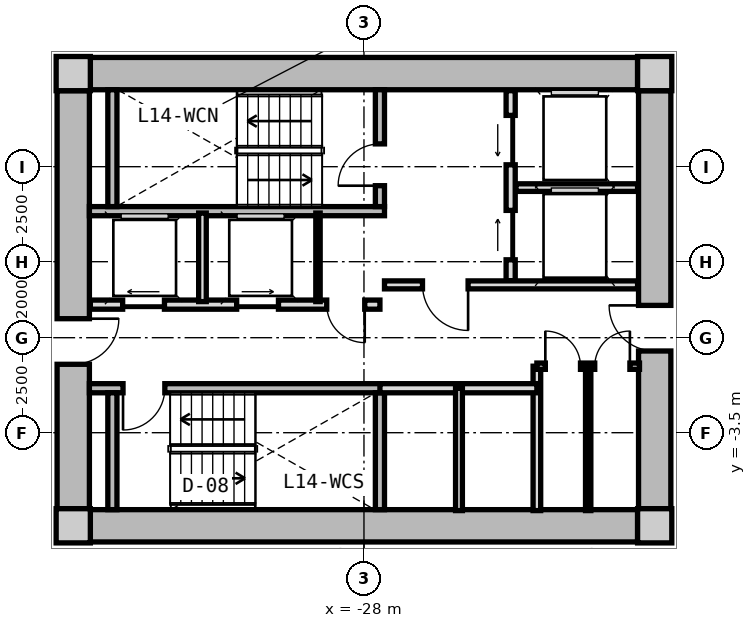
"""IFC4 building model, lengths in metres.
Left out: names, types, materials, properties, quantities, classifications, styles, units other than length and angle.
Written with IfcOpenShell. Run it as: python <this file> out.ifc"""

import sys

from ifc_helpers import new_model, si_unit, direction, frame, frame_2d, origin, origin_2d, place, context, subcontext, project, spatial, rectangle, extrude, source, transform, mapped, element, fill, save


model = new_model("IFC4")
c1 = context("Model", 3, precision=1e-05, world=origin(), true_north=direction((0.0, 1.0)))
c2 = subcontext(c1, "Body", "Model", "MODEL_VIEW")
j1 = project(units=[si_unit("LENGTHUNIT", "METRE"), si_unit("PLANEANGLEUNIT", "RADIAN")], contexts=[c1])
p1 = place(None, origin())
s1 = spatial("IfcSite", under=j1, at=p1, CompositionType="ELEMENT")
p2 = place(p1, origin())
s2 = spatial("IfcBuilding", under=s1, at=p2, CompositionType="ELEMENT")
p3 = place(p2, frame((0.0, 0.0, 49.05)))
s3 = spatial("IfcBuildingStorey", under=s2, at=p3, CompositionType="ELEMENT", Elevation=49.05)
m1 = source(origin(), c2, "Body", "SweptSolid", [
    extrude(rectangle(XDim=0.9, YDim=0.9, at=origin_2d()), origin(), (0.0, 0.0, 1.0), 3.05),
])
for number, where, z_axis, x_axis in (
    (1, (-35.65, -5.95, 0.0), (0.0, 0.0, 1.0), (1.0, 0.0, 0.0)),
    (2, (-20.35, -5.95, 0.0), (0.0, 0.0, 1.0), (1.0, 0.0, 0.0)),
    (3, (-20.35, 5.95, 0.0), (0.0, 0.0, 1.0), (1.0, 0.0, 0.0)),
    (4, (-35.65, 5.95, 0.0), (0.0, 0.0, 1.0), (1.0, 0.0, 0.0)),
):
    element("IfcColumn", number, at=place(p3, frame(where, z_axis=z_axis, x_axis=x_axis)), inside=s3, PredefinedType="COLUMN", context=c2, shape_type="MappedRepresentation", body=[
        mapped(m1, transform((0.0, 0.0, 0.0), x_axis=(1.0, 0.0, 0.0), y_axis=(0.0, 1.0, 0.0), z_axis=(0.0, 0.0, 1.0), scale=1.0)),
    ])
m2 = source(origin(), c2, "Body", "SweptSolid", [
    extrude(rectangle(XDim=14.4, YDim=0.85, at=frame_2d((7.2, 0.0))), origin(), (0.0, 0.0, 1.0), 2.79),
])
for number, where, z_axis, x_axis in (
    (5, (-35.2, 5.95, 0.0), (0.0, 0.0, 1.0), (1.0, 0.0, 0.0)),
    (6, (-20.8, -5.95, 0.0), (0.0, 0.0, 1.0), (-1.0, 0.0, 0.0)),
):
    element("IfcWall", number, at=place(p3, frame(where, z_axis=z_axis, x_axis=x_axis)), inside=s3, PredefinedType="SHEAR", context=c2, shape_type="MappedRepresentation", body=[
        mapped(m2, transform((0.0, 0.0, 0.0), x_axis=(1.0, 0.0, 0.0), y_axis=(0.0, 1.0, 0.0), z_axis=(0.0, 0.0, 1.0), scale=1.0)),
    ])
m3 = source(origin(), c2, "Body", "SweptSolid", [
    extrude(rectangle(XDim=11.0, YDim=0.85, at=frame_2d((5.5, 0.0))), origin(), (0.0, 0.0, 1.0), 2.79),
])
p4 = place(p3, frame((-35.65, -5.5, 0.0), z_axis=(0.0, 0.0, 1.0), x_axis=(0.0, 1.0, 0.0)))
e7 = element("IfcWall", 7, at=p4, inside=s3, PredefinedType="SHEAR", context=c2, shape_type="MappedRepresentation", body=[
    mapped(m3, transform((0.0, 0.0, 0.0), x_axis=(1.0, 0.0, 0.0), y_axis=(0.0, 1.0, 0.0), z_axis=(0.0, 0.0, 1.0), scale=1.0)),
])
p5 = place(p4, frame((3.8, 0.0, 0.0)))
e8 = element("IfcOpeningElement", 8, at=p5, cuts=e7, PredefinedType="OPENING", context=c2, shape_type="SweptSolid", body=[
    extrude(rectangle(XDim=1.2, YDim=2.15, at=frame_2d((0.6, 1.075))), frame((0.0, 0.435, 0.0), z_axis=(0.0, -1.0, 0.0), x_axis=(1.0, 0.0, 0.0)), (0.0, 0.0, 1.0), 0.87),
])
p6 = place(p3, frame((-20.35, 5.5, 0.0), z_axis=(0.0, 0.0, 1.0), x_axis=(0.0, -1.0, 0.0)))
e9 = element("IfcWall", 9, at=p6, inside=s3, PredefinedType="SHEAR", context=c2, shape_type="MappedRepresentation", body=[
    mapped(m3, transform((0.0, 0.0, 0.0), x_axis=(1.0, 0.0, 0.0), y_axis=(0.0, 1.0, 0.0), z_axis=(0.0, 0.0, 1.0), scale=1.0)),
])
p7 = place(p6, frame((5.65, 0.0, 0.0)))
e10 = element("IfcOpeningElement", 10, at=p7, cuts=e9, PredefinedType="OPENING", context=c2, shape_type="SweptSolid", body=[
    extrude(rectangle(XDim=1.2, YDim=2.15, at=frame_2d((0.6, 1.075))), frame((0.0, 0.435, 0.0), z_axis=(0.0, -1.0, 0.0), x_axis=(1.0, 0.0, 0.0)), (0.0, 0.0, 1.0), 0.87),
])
m4 = source(origin(), c2, "Body", "SweptSolid", [
    extrude(rectangle(XDim=7.765, YDim=0.24, at=frame_2d((3.883, 0.0))), origin(), (0.0, 0.0, 1.0), 2.79),
])
p8 = place(p3, frame((-35.225, 2.33, 0.0), z_axis=(0.0, 0.0, 1.0), x_axis=(1.0, 0.0, 0.0)))
e11 = element("IfcWall", 11, at=p8, inside=s3, PredefinedType="PARTITIONING", context=c2, shape_type="MappedRepresentation", body=[
    mapped(m4, transform((0.0, 0.0, 0.0), x_axis=(1.0, 0.0, 0.0), y_axis=(0.0, 1.0, 0.0), z_axis=(0.0, 0.0, 1.0), scale=1.0)),
])
m5 = source(origin(), c2, "Body", "SweptSolid", [
    extrude(rectangle(XDim=3.075, YDim=0.24, at=frame_2d((1.538, 0.0))), origin(), (0.0, 0.0, 1.0), 2.79),
])
p9 = place(p3, frame((-34.62, 2.45, 0.0), z_axis=(0.0, 0.0, 1.0), x_axis=(0.0, 1.0, 0.0)))
e12 = element("IfcWall", 12, at=p9, inside=s3, PredefinedType="PARTITIONING", context=c2, shape_type="MappedRepresentation", body=[
    mapped(m5, transform((0.0, 0.0, 0.0), x_axis=(1.0, 0.0, 0.0), y_axis=(0.0, 1.0, 0.0), z_axis=(0.0, 0.0, 1.0), scale=1.0)),
])
p10 = place(p3, frame((-27.58, 2.45, 0.0), z_axis=(0.0, 0.0, 1.0), x_axis=(0.0, 1.0, 0.0)))
e13 = element("IfcWall", 13, at=p10, inside=s3, PredefinedType="PARTITIONING", context=c2, shape_type="MappedRepresentation", body=[
    mapped(m5, transform((0.0, 0.0, 0.0), x_axis=(1.0, 0.0, 0.0), y_axis=(0.0, 1.0, 0.0), z_axis=(0.0, 0.0, 1.0), scale=1.0)),
])
p11 = place(p10, frame((0.55, 0.0, 0.0)))
e14 = element("IfcOpeningElement", 14, at=p11, cuts=e13, PredefinedType="OPENING", context=c2, shape_type="SweptSolid", body=[
    extrude(rectangle(XDim=1.1, YDim=2.15, at=frame_2d((0.55, 1.075))), frame((0.0, 0.13, 0.0), z_axis=(0.0, -1.0, 0.0), x_axis=(1.0, 0.0, 0.0)), (0.0, 0.0, 1.0), 0.26),
])
p12 = place(p3, frame((-35.225, -2.33, 0.0), z_axis=(0.0, 0.0, 1.0), x_axis=(1.0, 0.0, 0.0)))
e15 = element("IfcWall", 15, at=p12, inside=s3, PredefinedType="PARTITIONING", context=c2, shape_type="MappedRepresentation", body=[
    mapped(m4, transform((0.0, 0.0, 0.0), x_axis=(1.0, 0.0, 0.0), y_axis=(0.0, 1.0, 0.0), z_axis=(0.0, 0.0, 1.0), scale=1.0)),
])
p13 = place(p12, frame((0.885, 0.0, 0.0)))
e16 = element("IfcOpeningElement", 16, at=p13, cuts=e15, PredefinedType="OPENING", context=c2, shape_type="SweptSolid", body=[
    extrude(rectangle(XDim=1.1, YDim=2.15, at=frame_2d((0.55, 1.075))), frame((0.0, 0.13, 0.0), z_axis=(0.0, -1.0, 0.0), x_axis=(1.0, 0.0, 0.0)), (0.0, 0.0, 1.0), 0.26),
])
for number, where, z_axis, x_axis in (
    (17, (-34.62, -5.525, 0.0), (0.0, 0.0, 1.0), (0.0, 1.0, 0.0)),
    (18, (-27.58, -5.525, 0.0), (0.0, 0.0, 1.0), (0.0, 1.0, 0.0)),
):
    element("IfcWall", number, at=place(p3, frame(where, z_axis=z_axis, x_axis=x_axis)), inside=s3, PredefinedType="PARTITIONING", context=c2, shape_type="MappedRepresentation", body=[
        mapped(m5, transform((0.0, 0.0, 0.0), x_axis=(1.0, 0.0, 0.0), y_axis=(0.0, 1.0, 0.0), z_axis=(0.0, 0.0, 1.0), scale=1.0)),
    ])
m6 = source(origin(), c2, "Body", "SweptSolid", [
    extrude(rectangle(XDim=5.0, YDim=0.24, at=frame_2d((2.5, 0.0))), origin(), (0.0, 0.0, 1.0), 2.775),
])
p14 = place(p3, frame((-24.14, 0.5, 0.0), z_axis=(0.0, 0.0, 1.0), x_axis=(0.0, 1.0, 0.0)))
e19 = element("IfcWall", 19, at=p14, inside=s3, PredefinedType="PARTITIONING", context=c2, shape_type="MappedRepresentation", body=[
    mapped(m6, transform((0.0, 0.0, 0.0), x_axis=(1.0, 0.0, 0.0), y_axis=(0.0, 1.0, 0.0), z_axis=(0.0, 0.0, 1.0), scale=1.0)),
])
p15 = place(p14, frame((3.05, 0.0, 0.0)))
e20 = element("IfcOpeningElement", 20, at=p15, cuts=e19, PredefinedType="OPENING", context=c2, shape_type="SweptSolid", body=[
    extrude(rectangle(XDim=1.3, YDim=2.2, at=frame_2d((0.65, 1.1))), frame((0.0, 0.13, 0.0), z_axis=(0.0, -1.0, 0.0), x_axis=(1.0, 0.0, 0.0)), (0.0, 0.0, 1.0), 0.26),
])
p16 = place(p14, frame((0.55, 0.0, 0.0)))
e21 = element("IfcOpeningElement", 21, at=p16, cuts=e19, PredefinedType="OPENING", context=c2, shape_type="SweptSolid", body=[
    extrude(rectangle(XDim=1.3, YDim=2.2, at=frame_2d((0.65, 1.1))), frame((0.0, 0.13, 0.0), z_axis=(0.0, -1.0, 0.0), x_axis=(1.0, 0.0, 0.0)), (0.0, 0.0, 1.0), 0.26),
])
m7 = source(origin(), c2, "Body", "SweptSolid", [
    extrude(rectangle(XDim=3.2, YDim=0.2, at=frame_2d((1.6, 0.0))), origin(), (0.0, 0.0, 1.0), 2.775),
])
p17 = place(p3, frame((-24.0, 2.95, 0.0), z_axis=(0.0, 0.0, 1.0), x_axis=(1.0, 0.0, 0.0)))
e22 = element("IfcWall", 22, at=p17, inside=s3, PredefinedType="PARTITIONING", context=c2, shape_type="MappedRepresentation", body=[
    mapped(m7, transform((0.0, 0.0, 0.0), x_axis=(1.0, 0.0, 0.0), y_axis=(0.0, 1.0, 0.0), z_axis=(0.0, 0.0, 1.0), scale=1.0)),
])
m8 = source(origin(), c2, "Body", "SweptSolid", [
    extrude(rectangle(XDim=6.66, YDim=0.21, at=frame_2d((3.33, 0.0))), origin(), (0.0, 0.0, 1.0), 2.775),
])
p18 = place(p3, frame((-27.46, 0.39, 0.0), z_axis=(0.0, 0.0, 1.0), x_axis=(1.0, 0.0, 0.0)))
e23 = element("IfcWall", 23, at=p18, inside=s3, PredefinedType="PARTITIONING", context=c2, shape_type="MappedRepresentation", body=[
    mapped(m8, transform((0.0, 0.0, 0.0), x_axis=(1.0, 0.0, 0.0), y_axis=(0.0, 1.0, 0.0), z_axis=(0.0, 0.0, 1.0), scale=1.0)),
])
p19 = place(p18, frame((1.0, 0.0, 0.0)))
e24 = element("IfcOpeningElement", 24, at=p19, cuts=e23, PredefinedType="OPENING", context=c2, shape_type="SweptSolid", body=[
    extrude(rectangle(XDim=1.2, YDim=2.15, at=frame_2d((0.6, 1.075))), frame((0.0, 0.115, 0.0), z_axis=(0.0, -1.0, 0.0), x_axis=(1.0, 0.0, 0.0)), (0.0, 0.0, 1.0), 0.23),
])
m9 = source(origin(), c2, "Body", "SweptSolid", [
    extrude(rectangle(XDim=7.62, YDim=0.24, at=frame_2d((3.81, 0.0))), origin(), (0.0, 0.0, 1.0), 2.775),
])
p20 = place(p3, frame((-35.2, -0.13, 0.0), z_axis=(0.0, 0.0, 1.0), x_axis=(1.0, 0.0, 0.0)))
e25 = element("IfcWall", 25, at=p20, inside=s3, PredefinedType="PARTITIONING", context=c2, shape_type="MappedRepresentation", body=[
    mapped(m9, transform((0.0, 0.0, 0.0), x_axis=(1.0, 0.0, 0.0), y_axis=(0.0, 1.0, 0.0), z_axis=(0.0, 0.0, 1.0), scale=1.0)),
])
p21 = place(p20, frame((6.22, 0.0, 0.0)))
e26 = element("IfcOpeningElement", 26, at=p21, cuts=e25, PredefinedType="OPENING", context=c2, shape_type="SweptSolid", body=[
    extrude(rectangle(XDim=1.0, YDim=2.1, at=frame_2d((0.5, 1.05))), frame((0.0, 0.13, 0.0), z_axis=(0.0, -1.0, 0.0), x_axis=(1.0, 0.0, 0.0)), (0.0, 0.0, 1.0), 0.26),
])
p22 = place(p20, frame((0.85, 0.0, 0.0)))
e27 = element("IfcOpeningElement", 27, at=p22, cuts=e25, PredefinedType="OPENING", context=c2, shape_type="SweptSolid", body=[
    extrude(rectangle(XDim=1.1, YDim=2.2, at=frame_2d((0.55, 1.1))), frame((0.0, 0.13, 0.0), z_axis=(0.0, -1.0, 0.0), x_axis=(1.0, 0.0, 0.0)), (0.0, 0.0, 1.0), 0.26),
])
p23 = place(p20, frame((3.85, 0.0, 0.0)))
e28 = element("IfcOpeningElement", 28, at=p23, cuts=e25, PredefinedType="OPENING", context=c2, shape_type="SweptSolid", body=[
    extrude(rectangle(XDim=1.1, YDim=2.2, at=frame_2d((0.55, 1.1))), frame((0.0, 0.13, 0.0), z_axis=(0.0, -1.0, 0.0), x_axis=(1.0, 0.0, 0.0)), (0.0, 0.0, 1.0), 0.26),
])
m10 = source(origin(), c2, "Body", "SweptSolid", [
    extrude(rectangle(XDim=2.33, YDim=0.115, at=frame_2d((1.165, 0.0))), origin(), (0.0, 0.0, 1.0), 2.775),
])
p24 = place(p3, frame((-29.21, -0.05, 0.0), z_axis=(0.0, 0.0, 1.0), x_axis=(0.0, 1.0, 0.0)))
e29 = element("IfcWall", 29, at=p24, inside=s3, PredefinedType="PARTITIONING", context=c2, shape_type="MappedRepresentation", body=[
    mapped(m10, transform((0.0, 0.0, 0.0), x_axis=(1.0, 0.0, 0.0), y_axis=(0.0, 1.0, 0.0), z_axis=(0.0, 0.0, 1.0), scale=1.0)),
])
m11 = source(origin(), c2, "Body", "SweptSolid", [
    extrude(rectangle(XDim=2.33, YDim=0.2, at=frame_2d((1.165, 0.0))), origin(), (0.0, 0.0, 1.0), 2.775),
])
p25 = place(p3, frame((-32.25, -0.05, 0.0), z_axis=(0.0, 0.0, 1.0), x_axis=(0.0, 1.0, 0.0)))
e30 = element("IfcWall", 30, at=p25, inside=s3, PredefinedType="PARTITIONING", context=c2, shape_type="MappedRepresentation", body=[
    mapped(m11, transform((0.0, 0.0, 0.0), x_axis=(1.0, 0.0, 0.0), y_axis=(0.0, 1.0, 0.0), z_axis=(0.0, 0.0, 1.0), scale=1.0)),
])
m12 = source(origin(), c2, "Body", "SweptSolid", [
    extrude(rectangle(XDim=3.8, YDim=0.2, at=frame_2d((1.9, 0.0))), origin(), (0.0, 0.0, 1.0), 2.775),
])
p26 = place(p3, frame((-23.45, -5.55, 0.0), z_axis=(0.0, 0.0, 1.0), x_axis=(0.0, 1.0, 0.0)))
e31 = element("IfcWall", 31, at=p26, inside=s3, PredefinedType="PARTITIONING", context=c2, shape_type="MappedRepresentation", body=[
    mapped(m12, transform((0.0, 0.0, 0.0), x_axis=(1.0, 0.0, 0.0), y_axis=(0.0, 1.0, 0.0), z_axis=(0.0, 0.0, 1.0), scale=1.0)),
])
m13 = source(origin(), c2, "Body", "SweptSolid", [
    extrude(rectangle(XDim=4.13, YDim=0.24, at=frame_2d((2.065, 0.0))), origin(), (0.0, 0.0, 1.0), 2.775),
])
p27 = place(p3, frame((-27.58, -2.33, 0.0), z_axis=(0.0, 0.0, 1.0), x_axis=(1.0, 0.0, 0.0)))
e32 = element("IfcWall", 32, at=p27, inside=s3, PredefinedType="PARTITIONING", context=c2, shape_type="MappedRepresentation", body=[
    mapped(m13, transform((0.0, 0.0, 0.0), x_axis=(1.0, 0.0, 0.0), y_axis=(0.0, 1.0, 0.0), z_axis=(0.0, 0.0, 1.0), scale=1.0)),
])
m14 = source(origin(), c2, "Body", "SweptSolid", [
    extrude(rectangle(XDim=3.22, YDim=0.18, at=frame_2d((1.61, 0.0))), origin(), (0.0, 0.0, 1.0), 2.775),
])
p28 = place(p3, frame((-25.5, -5.55, 0.0), z_axis=(0.0, 0.0, 1.0), x_axis=(0.0, 1.0, 0.0)))
e33 = element("IfcWall", 33, at=p28, inside=s3, PredefinedType="PARTITIONING", context=c2, shape_type="MappedRepresentation", body=[
    mapped(m14, transform((0.0, 0.0, 0.0), x_axis=(1.0, 0.0, 0.0), y_axis=(0.0, 1.0, 0.0), z_axis=(0.0, 0.0, 1.0), scale=1.0)),
])
m15 = source(origin(), c2, "Body", "SweptSolid", [
    extrude(rectangle(XDim=2.7, YDim=0.165, at=frame_2d((1.35, 0.0))), origin(), (0.0, 0.0, 1.0), 2.775),
])
p29 = place(p3, frame((-23.45, -1.75, 0.0), z_axis=(0.0, 0.0, 1.0), x_axis=(1.0, 0.0, 0.0)))
e34 = element("IfcWall", 34, at=p29, inside=s3, PredefinedType="PARTITIONING", context=c2, shape_type="MappedRepresentation", body=[
    mapped(m15, transform((0.0, 0.0, 0.0), x_axis=(1.0, 0.0, 0.0), y_axis=(0.0, 1.0, 0.0), z_axis=(0.0, 0.0, 1.0), scale=1.0)),
])
p30 = place(p29, frame((0.222, 0.0, 0.0)))
e35 = element("IfcOpeningElement", 35, at=p30, cuts=e34, PredefinedType="OPENING", context=c2, shape_type="SweptSolid", body=[
    extrude(rectangle(XDim=0.925, YDim=2.1, at=frame_2d((0.462, 1.05))), frame((0.0, 0.093, 0.0), z_axis=(0.0, -1.0, 0.0), x_axis=(1.0, 0.0, 0.0)), (0.0, 0.0, 1.0), 0.185),
])
p31 = place(p29, frame((1.522, 0.0, 0.0)))
e36 = element("IfcOpeningElement", 36, at=p31, cuts=e34, PredefinedType="OPENING", context=c2, shape_type="SweptSolid", body=[
    extrude(rectangle(XDim=0.925, YDim=2.1, at=frame_2d((0.462, 1.05))), frame((0.0, 0.093, 0.0), z_axis=(0.0, -1.0, 0.0), x_axis=(1.0, 0.0, 0.0)), (0.0, 0.0, 1.0), 0.185),
])
m16 = source(origin(), c2, "Body", "SweptSolid", [
    extrude(rectangle(XDim=3.8, YDim=0.14, at=frame_2d((1.9, 0.0))), origin(), (0.0, 0.0, 1.0), 2.775),
])
p32 = place(p3, frame((-22.1, -5.55, 0.0), z_axis=(0.0, 0.0, 1.0), x_axis=(0.0, 1.0, 0.0)))
e37 = element("IfcWall", 37, at=p32, inside=s3, PredefinedType="PARTITIONING", context=c2, shape_type="MappedRepresentation", body=[
    mapped(m16, transform((0.0, 0.0, 0.0), x_axis=(1.0, 0.0, 0.0), y_axis=(0.0, 1.0, 0.0), z_axis=(0.0, 0.0, 1.0), scale=1.0)),
])
m17 = source(origin(), c2, "Body", "SweptSolid", [
    extrude(rectangle(XDim=1.1, YDim=2.15, at=frame_2d((0.55, 1.075))), frame((0.0, 0.025, 0.0), z_axis=(0.0, -1.0, 0.0), x_axis=(1.0, 0.0, 0.0)), (0.0, 0.0, 1.0), 0.05),
])
p33 = place(p11, origin())
e38 = element("IfcDoor", 38, at=p33, inside=s3, OperationType="SINGLE_SWING_LEFT", PredefinedType="DOOR", context=c2, shape_type="MappedRepresentation", body=[
    mapped(m17, transform((0.0, 0.0, 0.0), x_axis=(1.0, 0.0, 0.0), y_axis=(0.0, 1.0, 0.0), z_axis=(0.0, 0.0, 1.0), scale=1.0)),
])
fill(e14, e38)
p34 = place(p13, frame((1.1, 0.0, 0.0), z_axis=(0.0, 0.0, 1.0), x_axis=(-1.0, 0.0, 0.0)))
e39 = element("IfcDoor", 39, at=p34, inside=s3, OperationType="SINGLE_SWING_RIGHT", PredefinedType="DOOR", context=c2, shape_type="MappedRepresentation", body=[
    mapped(m17, transform((0.0, 0.0, 0.0), x_axis=(1.0, 0.0, 0.0), y_axis=(0.0, 1.0, 0.0), z_axis=(0.0, 0.0, 1.0), scale=1.0)),
])
fill(e16, e39)
m18 = source(origin(), c2, "Body", "SweptSolid", [
    extrude(rectangle(XDim=1.3, YDim=2.2, at=frame_2d((0.65, 1.1))), frame((0.0, 0.025, 0.0), z_axis=(0.0, -1.0, 0.0), x_axis=(1.0, 0.0, 0.0)), (0.0, 0.0, 1.0), 0.05),
])
p35 = place(p15, origin())
e40 = element("IfcDoor", 40, at=p35, inside=s3, OperationType="SLIDING_TO_LEFT", PredefinedType="DOOR", context=c2, shape_type="MappedRepresentation", body=[
    mapped(m18, transform((0.0, 0.0, 0.0), x_axis=(1.0, 0.0, 0.0), y_axis=(0.0, 1.0, 0.0), z_axis=(0.0, 0.0, 1.0), scale=1.0)),
])
fill(e20, e40)
p36 = place(p16, origin())
e41 = element("IfcDoor", 41, at=p36, inside=s3, OperationType="SLIDING_TO_RIGHT", PredefinedType="DOOR", context=c2, shape_type="MappedRepresentation", body=[
    mapped(m18, transform((0.0, 0.0, 0.0), x_axis=(1.0, 0.0, 0.0), y_axis=(0.0, 1.0, 0.0), z_axis=(0.0, 0.0, 1.0), scale=1.0)),
])
fill(e21, e41)
m19 = source(origin(), c2, "Body", "SweptSolid", [
    extrude(rectangle(XDim=1.2, YDim=2.15, at=frame_2d((0.6, 1.075))), frame((0.0, 0.025, 0.0), z_axis=(0.0, -1.0, 0.0), x_axis=(1.0, 0.0, 0.0)), (0.0, 0.0, 1.0), 0.05),
])
p37 = place(p19, frame((1.2, 0.0, 0.0), z_axis=(0.0, 0.0, 1.0), x_axis=(-1.0, 0.0, 0.0)))
e42 = element("IfcDoor", 42, at=p37, inside=s3, OperationType="SINGLE_SWING_LEFT", PredefinedType="DOOR", context=c2, shape_type="MappedRepresentation", body=[
    mapped(m19, transform((0.0, 0.0, 0.0), x_axis=(1.0, 0.0, 0.0), y_axis=(0.0, 1.0, 0.0), z_axis=(0.0, 0.0, 1.0), scale=1.0)),
])
fill(e24, e42)
p38 = place(p5, frame((1.2, 0.0, 0.0), z_axis=(0.0, 0.0, 1.0), x_axis=(-1.0, 0.0, 0.0)))
e43 = element("IfcDoor", 43, at=p38, inside=s3, OperationType="SINGLE_SWING_LEFT", PredefinedType="DOOR", context=c2, shape_type="MappedRepresentation", body=[
    mapped(m19, transform((0.0, 0.0, 0.0), x_axis=(1.0, 0.0, 0.0), y_axis=(0.0, 1.0, 0.0), z_axis=(0.0, 0.0, 1.0), scale=1.0)),
])
fill(e8, e43)
p39 = place(p7, frame((1.2, 0.0, 0.0), z_axis=(0.0, 0.0, 1.0), x_axis=(-1.0, 0.0, 0.0)))
e44 = element("IfcDoor", 44, at=p39, inside=s3, OperationType="SINGLE_SWING_RIGHT", PredefinedType="DOOR", context=c2, shape_type="MappedRepresentation", body=[
    mapped(m19, transform((0.0, 0.0, 0.0), x_axis=(1.0, 0.0, 0.0), y_axis=(0.0, 1.0, 0.0), z_axis=(0.0, 0.0, 1.0), scale=1.0)),
])
fill(e10, e44)
m20 = source(origin(), c2, "Body", "SweptSolid", [
    extrude(rectangle(XDim=1.0, YDim=2.1, at=frame_2d((0.5, 1.05))), frame((0.0, 0.025, 0.0), z_axis=(0.0, -1.0, 0.0), x_axis=(1.0, 0.0, 0.0)), (0.0, 0.0, 1.0), 0.05),
])
p40 = place(p21, frame((1.0, 0.0, 0.0), z_axis=(0.0, 0.0, 1.0), x_axis=(-1.0, 0.0, 0.0)))
e45 = element("IfcDoor", 45, at=p40, inside=s3, OperationType="SINGLE_SWING_LEFT", PredefinedType="DOOR", context=c2, shape_type="MappedRepresentation", body=[
    mapped(m20, transform((0.0, 0.0, 0.0), x_axis=(1.0, 0.0, 0.0), y_axis=(0.0, 1.0, 0.0), z_axis=(0.0, 0.0, 1.0), scale=1.0)),
])
fill(e26, e45)
m21 = source(origin(), c2, "Body", "SweptSolid", [
    extrude(rectangle(XDim=1.1, YDim=2.2, at=frame_2d((0.55, 1.1))), frame((0.0, 0.025, 0.0), z_axis=(0.0, -1.0, 0.0), x_axis=(1.0, 0.0, 0.0)), (0.0, 0.0, 1.0), 0.05),
])
p41 = place(p22, origin())
e46 = element("IfcDoor", 46, at=p41, inside=s3, OperationType="SLIDING_TO_LEFT", PredefinedType="DOOR", context=c2, shape_type="MappedRepresentation", body=[
    mapped(m21, transform((0.0, 0.0, 0.0), x_axis=(1.0, 0.0, 0.0), y_axis=(0.0, 1.0, 0.0), z_axis=(0.0, 0.0, 1.0), scale=1.0)),
])
fill(e27, e46)
p42 = place(p23, origin())
e47 = element("IfcDoor", 47, at=p42, inside=s3, OperationType="SLIDING_TO_RIGHT", PredefinedType="DOOR", context=c2, shape_type="MappedRepresentation", body=[
    mapped(m21, transform((0.0, 0.0, 0.0), x_axis=(1.0, 0.0, 0.0), y_axis=(0.0, 1.0, 0.0), z_axis=(0.0, 0.0, 1.0), scale=1.0)),
])
fill(e28, e47)
m22 = source(origin(), c2, "Body", "SweptSolid", [
    extrude(rectangle(XDim=0.925, YDim=2.1, at=frame_2d((0.462, 1.05))), frame((0.0, 0.025, 0.0), z_axis=(0.0, -1.0, 0.0), x_axis=(1.0, 0.0, 0.0)), (0.0, 0.0, 1.0), 0.05),
])
p43 = place(p30, origin())
e48 = element("IfcDoor", 48, at=p43, inside=s3, OperationType="SINGLE_SWING_LEFT", PredefinedType="DOOR", context=c2, shape_type="MappedRepresentation", body=[
    mapped(m22, transform((0.0, 0.0, 0.0), x_axis=(1.0, 0.0, 0.0), y_axis=(0.0, 1.0, 0.0), z_axis=(0.0, 0.0, 1.0), scale=1.0)),
])
fill(e35, e48)
p44 = place(p31, origin())
e49 = element("IfcDoor", 49, at=p44, inside=s3, OperationType="SINGLE_SWING_RIGHT", PredefinedType="DOOR", context=c2, shape_type="MappedRepresentation", body=[
    mapped(m22, transform((0.0, 0.0, 0.0), x_axis=(1.0, 0.0, 0.0), y_axis=(0.0, 1.0, 0.0), z_axis=(0.0, 0.0, 1.0), scale=1.0)),
])
fill(e36, e49)
save(model, sys.argv[1])
